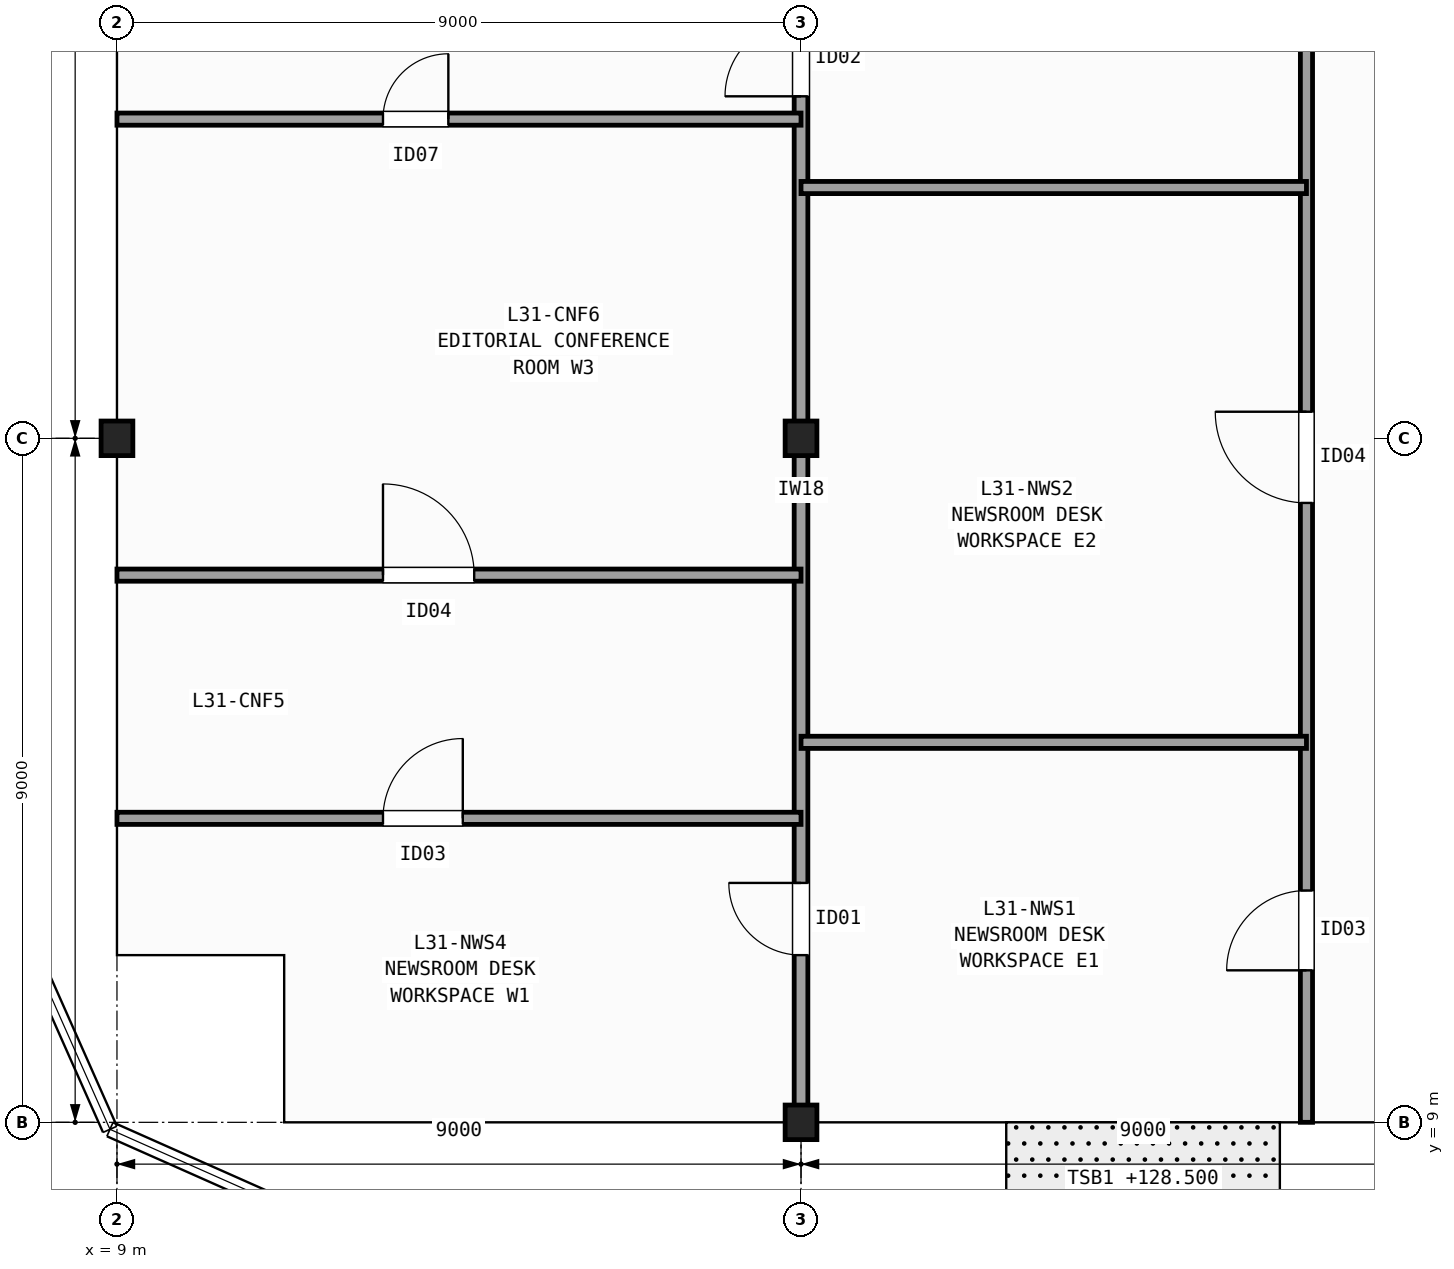
"""IFC4 building model, lengths in metres.
Left out: names, types, materials, properties, quantities, classifications, styles, units other than length and angle.
Written with IfcOpenShell. Run it as: python <this file> out.ifc"""

import sys

from ifc_helpers import new_model, si_unit, direction, frame, frame_2d, origin, origin_2d, place, context, subcontext, project, spatial, rectangle, i_section, extrude, element, fill, save


model = new_model("IFC4")
c1 = context("Model", 3, precision=1e-05, world=origin(), true_north=direction((0.0, 1.0)))
c2 = subcontext(c1, "Body", "Model", "MODEL_VIEW")
j1 = project(units=[si_unit("LENGTHUNIT", "METRE"), si_unit("PLANEANGLEUNIT", "RADIAN")], contexts=[c1])
p1 = place(None, origin())
s1 = spatial("IfcSite", under=j1, at=p1, CompositionType="ELEMENT")
p2 = place(p1, origin())
s2 = spatial("IfcBuilding", under=s1, at=p2, CompositionType="ELEMENT")
p3 = place(p2, frame((0.0, 0.0, 128.5)))
s3 = spatial("IfcBuildingStorey", under=s2, at=p3, CompositionType="ELEMENT", Elevation=128.5)
for number, where, z_axis, x_axis in (
    (1, (9.0, 18.0, 0.0), (0.0, 0.0, 1.0), (1.0, 0.0, 0.0)),
    (2, (18.0, 9.0, 0.0), (0.0, 0.0, 1.0), (1.0, 0.0, 0.0)),
    (3, (18.0, 18.0, 0.0), (0.0, 0.0, 1.0), (1.0, 0.0, 0.0)),
):
    element("IfcColumn", number, at=place(p3, frame(where, z_axis=z_axis, x_axis=x_axis)), inside=s3, PredefinedType="COLUMN", context=c2, shape_type="SweptSolid", body=[
        extrude(i_section(OverallWidth=0.418, OverallDepth=0.455, WebThickness=0.042, FlangeThickness=0.068, FilletRadius=0.015, at=origin_2d()), origin(), (0.0, 0.0, 1.0), 3.7),
    ])
p4 = place(p3, frame((24.65, 9.0, 0.0), z_axis=(0.0, 0.0, 1.0), x_axis=(0.0, 1.0, 0.0)))
e4 = element("IfcWall", 4, at=p4, inside=s3, PredefinedType="PARTITIONING", context=c2, shape_type="SweptSolid", body=[
    extrude(rectangle(XDim=19.2, YDim=0.16, at=frame_2d((9.6, 0.0))), origin(), (0.0, 0.0, 1.0), 2.634),
])
p5 = place(p4, frame((2.0, 0.0, 0.0)))
e5 = element("IfcOpeningElement", 5, at=p5, cuts=e4, PredefinedType="OPENING", context=c2, shape_type="SweptSolid", body=[
    extrude(rectangle(XDim=1.05, YDim=2.15, at=frame_2d((0.525, 1.075))), frame((0.0, 0.09, 0.0), z_axis=(0.0, -1.0, 0.0), x_axis=(1.0, 0.0, 0.0)), (0.0, 0.0, 1.0), 0.18),
])
p6 = place(p4, frame((8.15, 0.0, 0.0)))
e6 = element("IfcOpeningElement", 6, at=p6, cuts=e4, PredefinedType="OPENING", context=c2, shape_type="SweptSolid", body=[
    extrude(rectangle(XDim=1.2, YDim=2.15, at=frame_2d((0.6, 1.075))), frame((0.0, 0.09, 0.0), z_axis=(0.0, -1.0, 0.0), x_axis=(1.0, 0.0, 0.0)), (0.0, 0.0, 1.0), 0.18),
])
p7 = place(p4, frame((15.215, 0.0, 0.0)))
e7 = element("IfcOpeningElement", 7, at=p7, cuts=e4, PredefinedType="OPENING", context=c2, shape_type="SweptSolid", body=[
    extrude(rectangle(XDim=0.86, YDim=2.05, at=frame_2d((0.43, 1.025))), frame((0.0, 0.09, 0.0), z_axis=(0.0, -1.0, 0.0), x_axis=(1.0, 0.0, 0.0)), (0.0, 0.0, 1.0), 0.18),
])
p8 = place(p3, frame((18.0, 9.0, 0.0), z_axis=(0.0, 0.0, 1.0), x_axis=(0.0, 1.0, 0.0)))
e8 = element("IfcWall", 8, at=p8, inside=s3, PredefinedType="PARTITIONING", context=c2, shape_type="SweptSolid", body=[
    extrude(rectangle(XDim=19.13, YDim=0.18, at=frame_2d((9.565, 0.0))), origin(), (0.0, 0.0, 1.0), 2.634),
])
p9 = place(p8, frame((2.2, 0.0, 0.0)))
e9 = element("IfcOpeningElement", 9, at=p9, cuts=e8, PredefinedType="OPENING", context=c2, shape_type="SweptSolid", body=[
    extrude(rectangle(XDim=0.95, YDim=2.1, at=frame_2d((0.475, 1.05))), frame((0.0, 0.1, 0.0), z_axis=(0.0, -1.0, 0.0), x_axis=(1.0, 0.0, 0.0)), (0.0, 0.0, 1.0), 0.2),
])
p10 = place(p8, frame((13.5, 0.0, 0.0)))
e10 = element("IfcOpeningElement", 10, at=p10, cuts=e8, PredefinedType="OPENING", context=c2, shape_type="SweptSolid", body=[
    extrude(rectangle(XDim=1.0, YDim=2.1, at=frame_2d((0.5, 1.05))), frame((0.0, 0.1, 0.0), z_axis=(0.0, -1.0, 0.0), x_axis=(1.0, 0.0, 0.0)), (0.0, 0.0, 1.0), 0.2),
])
for number, where, z_axis, x_axis in (
    (11, (18.0, 14.0, 0.0), (0.0, 0.0, 1.0), (1.0, 0.0, 0.0)),
    (12, (18.0, 21.3, 0.0), (0.0, 0.0, 1.0), (1.0, 0.0, 0.0)),
):
    element("IfcWall", number, at=place(p3, frame(where, z_axis=z_axis, x_axis=x_axis)), inside=s3, PredefinedType="PARTITIONING", context=c2, shape_type="SweptSolid", body=[
        extrude(rectangle(XDim=6.65, YDim=0.16, at=frame_2d((3.325, 0.0))), origin(), (0.0, 0.0, 1.0), 2.792),
    ])
p11 = place(p3, frame((9.0, 13.0, 0.0), z_axis=(0.0, 0.0, 1.0), x_axis=(1.0, 0.0, 0.0)))
e13 = element("IfcWall", 13, at=p11, inside=s3, PredefinedType="PARTITIONING", context=c2, shape_type="SweptSolid", body=[
    extrude(rectangle(XDim=9.0, YDim=0.16, at=frame_2d((4.5, 0.0))), origin(), (0.0, 0.0, 1.0), 2.792),
])
p12 = place(p11, frame((3.5, 0.0, 0.0)))
e14 = element("IfcOpeningElement", 14, at=p12, cuts=e13, PredefinedType="OPENING", context=c2, shape_type="SweptSolid", body=[
    extrude(rectangle(XDim=1.05, YDim=2.15, at=frame_2d((0.525, 1.075))), frame((0.0, 0.09, 0.0), z_axis=(0.0, -1.0, 0.0), x_axis=(1.0, 0.0, 0.0)), (0.0, 0.0, 1.0), 0.18),
])
p13 = place(p3, frame((9.0, 16.2, 0.0), z_axis=(0.0, 0.0, 1.0), x_axis=(1.0, 0.0, 0.0)))
e15 = element("IfcWall", 15, at=p13, inside=s3, PredefinedType="PARTITIONING", context=c2, shape_type="SweptSolid", body=[
    extrude(rectangle(XDim=9.0, YDim=0.16, at=frame_2d((4.5, 0.0))), origin(), (0.0, 0.0, 1.0), 2.792),
])
p14 = place(p13, frame((3.5, 0.0, 0.0)))
e16 = element("IfcOpeningElement", 16, at=p14, cuts=e15, PredefinedType="OPENING", context=c2, shape_type="SweptSolid", body=[
    extrude(rectangle(XDim=1.2, YDim=2.15, at=frame_2d((0.6, 1.075))), frame((0.0, 0.09, 0.0), z_axis=(0.0, -1.0, 0.0), x_axis=(1.0, 0.0, 0.0)), (0.0, 0.0, 1.0), 0.18),
])
p15 = place(p3, frame((9.0, 22.2, 0.0), z_axis=(0.0, 0.0, 1.0), x_axis=(1.0, 0.0, 0.0)))
e17 = element("IfcWall", 17, at=p15, inside=s3, PredefinedType="PARTITIONING", context=c2, shape_type="SweptSolid", body=[
    extrude(rectangle(XDim=9.0, YDim=0.16, at=frame_2d((4.5, 0.0))), origin(), (0.0, 0.0, 1.0), 2.634),
])
p16 = place(p15, frame((3.5, 0.0, 0.0)))
e18 = element("IfcOpeningElement", 18, at=p16, cuts=e17, PredefinedType="OPENING", context=c2, shape_type="SweptSolid", body=[
    extrude(rectangle(XDim=0.86, YDim=2.05, at=frame_2d((0.43, 1.025))), frame((0.0, 0.09, 0.0), z_axis=(0.0, -1.0, 0.0), x_axis=(1.0, 0.0, 0.0)), (0.0, 0.0, 1.0), 0.18),
])
p17 = place(p5, origin())
e19 = element("IfcDoor", 19, at=p17, inside=s3, OperationType="SINGLE_SWING_LEFT", PredefinedType="DOOR", context=c2, shape_type="SweptSolid", body=[
    extrude(rectangle(XDim=1.05, YDim=2.15, at=frame_2d((0.525, 1.075))), frame((0.0, 0.025, 0.0), z_axis=(0.0, -1.0, 0.0), x_axis=(1.0, 0.0, 0.0)), (0.0, 0.0, 1.0), 0.05),
])
fill(e5, e19)
p18 = place(p6, origin())
e20 = element("IfcDoor", 20, at=p18, inside=s3, OperationType="SINGLE_SWING_RIGHT", PredefinedType="DOOR", context=c2, shape_type="SweptSolid", body=[
    extrude(rectangle(XDim=1.2, YDim=2.15, at=frame_2d((0.6, 1.075))), frame((0.0, 0.025, 0.0), z_axis=(0.0, -1.0, 0.0), x_axis=(1.0, 0.0, 0.0)), (0.0, 0.0, 1.0), 0.05),
])
fill(e6, e20)
p19 = place(p9, origin())
e21 = element("IfcDoor", 21, at=p19, inside=s3, OperationType="SINGLE_SWING_RIGHT", PredefinedType="DOOR", context=c2, shape_type="SweptSolid", body=[
    extrude(rectangle(XDim=0.95, YDim=2.1, at=frame_2d((0.475, 1.05))), frame((0.0, 0.025, 0.0), z_axis=(0.0, -1.0, 0.0), x_axis=(1.0, 0.0, 0.0)), (0.0, 0.0, 1.0), 0.05),
])
fill(e9, e21)
p20 = place(p10, origin())
e22 = element("IfcDoor", 22, at=p20, inside=s3, OperationType="SINGLE_SWING_LEFT", PredefinedType="DOOR", context=c2, shape_type="SweptSolid", body=[
    extrude(rectangle(XDim=1.0, YDim=2.1, at=frame_2d((0.5, 1.05))), frame((0.0, 0.025, 0.0), z_axis=(0.0, -1.0, 0.0), x_axis=(1.0, 0.0, 0.0)), (0.0, 0.0, 1.0), 0.05),
])
fill(e10, e22)
p21 = place(p12, origin())
e23 = element("IfcDoor", 23, at=p21, inside=s3, OperationType="SINGLE_SWING_RIGHT", PredefinedType="DOOR", context=c2, shape_type="SweptSolid", body=[
    extrude(rectangle(XDim=1.05, YDim=2.15, at=frame_2d((0.525, 1.075))), frame((0.0, 0.025, 0.0), z_axis=(0.0, -1.0, 0.0), x_axis=(1.0, 0.0, 0.0)), (0.0, 0.0, 1.0), 0.05),
])
fill(e14, e23)
p22 = place(p14, origin())
e24 = element("IfcDoor", 24, at=p22, inside=s3, OperationType="SINGLE_SWING_LEFT", PredefinedType="DOOR", context=c2, shape_type="SweptSolid", body=[
    extrude(rectangle(XDim=1.2, YDim=2.15, at=frame_2d((0.6, 1.075))), frame((0.0, 0.025, 0.0), z_axis=(0.0, -1.0, 0.0), x_axis=(1.0, 0.0, 0.0)), (0.0, 0.0, 1.0), 0.05),
])
fill(e16, e24)
p23 = place(p16, origin())
e25 = element("IfcDoor", 25, at=p23, inside=s3, OperationType="SINGLE_SWING_RIGHT", PredefinedType="DOOR", context=c2, shape_type="SweptSolid", body=[
    extrude(rectangle(XDim=0.86, YDim=2.05, at=frame_2d((0.43, 1.025))), frame((0.0, 0.025, 0.0), z_axis=(0.0, -1.0, 0.0), x_axis=(1.0, 0.0, 0.0)), (0.0, 0.0, 1.0), 0.05),
])
fill(e18, e25)
save(model, sys.argv[1])
